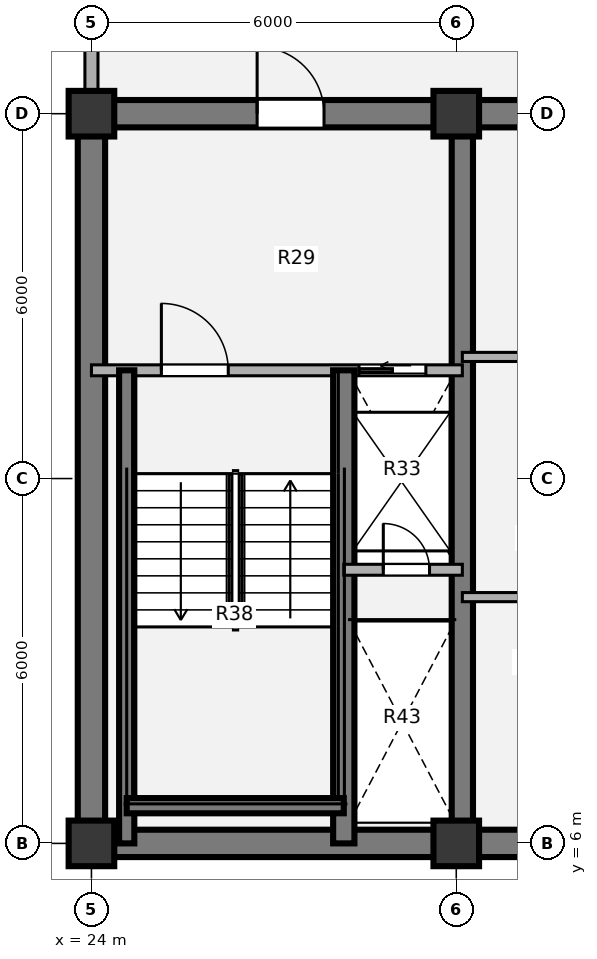
"""IFC4 building model, lengths in metres.
Left out: names, types, materials, properties, quantities, classifications, styles, units other than length and angle.
Written with IfcOpenShell. Run it as: python <this file> out.ifc"""

import sys

from ifc_helpers import new_model, si_unit, direction, frame, frame_2d, origin, origin_2d, place, context, subcontext, project, spatial, rectangle, extrude, source, transform, mapped, element, fill, save


model = new_model("IFC4")
c1 = context("Model", 3, precision=1e-05, world=origin(), true_north=direction((0.0, 1.0)))
c2 = subcontext(c1, "Body", "Model", "MODEL_VIEW")
j1 = project(units=[si_unit("LENGTHUNIT", "METRE"), si_unit("PLANEANGLEUNIT", "RADIAN")], contexts=[c1])
p1 = place(None, origin())
s1 = spatial("IfcSite", under=j1, at=p1, CompositionType="ELEMENT")
p2 = place(p1, origin())
s2 = spatial("IfcBuilding", under=s1, at=p2, CompositionType="ELEMENT")
p3 = place(p2, frame((0.0, 0.0, 205.56)))
s3 = spatial("IfcBuildingStorey", under=s2, at=p3, CompositionType="ELEMENT", Elevation=205.56)
m1 = source(origin(), c2, "Body", "SweptSolid", [
    extrude(rectangle(XDim=0.75, YDim=0.75, at=origin_2d()), origin(), (0.0, 0.0, 1.0), 3.78),
])
for number, where, z_axis, x_axis in (
    (1, (24.0, 6.0, 0.0), (0.0, 0.0, 1.0), (1.0, 0.0, 0.0)),
    (2, (30.0, 6.0, 0.0), (0.0, 0.0, 1.0), (1.0, 0.0, 0.0)),
    (3, (24.0, 18.0, 0.0), (0.0, 0.0, 1.0), (1.0, 0.0, 0.0)),
    (4, (30.0, 18.0, 0.0), (0.0, 0.0, 1.0), (1.0, 0.0, 0.0)),
):
    element("IfcColumn", number, at=place(p3, frame(where, z_axis=z_axis, x_axis=x_axis)), inside=s3, PredefinedType="COLUMN", context=c2, shape_type="MappedRepresentation", body=[
        mapped(m1, transform((0.0, 0.0, 0.0), x_axis=(1.0, 0.0, 0.0), y_axis=(0.0, 1.0, 0.0), z_axis=(0.0, 0.0, 1.0), scale=1.0)),
    ])
p4 = place(p3, frame((48.225, 6.0, 0.0), z_axis=(0.0, 0.0, 1.0), x_axis=(-1.0, 0.0, 0.0)))
e5 = element("IfcWall", 5, at=p4, inside=s3, PredefinedType="SHEAR", context=c2, shape_type="SweptSolid", body=[
    extrude(rectangle(XDim=24.45, YDim=0.45, at=frame_2d((12.225, 0.0))), origin(), (0.0, 0.0, 1.0), 3.78),
])
p5 = place(p3, frame((24.0, 6.0, 0.0), z_axis=(0.0, 0.0, 1.0), x_axis=(0.0, 1.0, 0.0)))
e6 = element("IfcWall", 6, at=p5, inside=s3, PredefinedType="SHEAR", context=c2, shape_type="SweptSolid", body=[
    extrude(rectangle(XDim=12.0, YDim=0.45, at=frame_2d((6.0, 0.0))), origin(), (0.0, 0.0, 1.0), 3.78),
])
p6 = place(p3, frame((23.775, 18.0, 0.0), z_axis=(0.0, 0.0, 1.0), x_axis=(1.0, 0.0, 0.0)))
e7 = element("IfcWall", 7, at=p6, inside=s3, PredefinedType="SHEAR", context=c2, shape_type="SweptSolid", body=[
    extrude(rectangle(XDim=9.425, YDim=0.45, at=frame_2d((4.712, 0.0))), origin(), (0.0, 0.0, 1.0), 3.78),
])
p7 = place(p6, frame((2.95, 0.0, 0.0)))
e8 = element("IfcOpeningElement", 8, at=p7, cuts=e7, PredefinedType="OPENING", context=c2, shape_type="SweptSolid", body=[
    extrude(rectangle(XDim=1.1, YDim=2.1, at=origin_2d()), frame((0.55, 0.235, 1.05), z_axis=(0.0, -1.0, 0.0), x_axis=(1.0, 0.0, 0.0)), (0.0, 0.0, 1.0), 0.47),
])
p8 = place(p3, frame((30.1, 6.0, 0.0), z_axis=(0.0, 0.0, 1.0), x_axis=(0.0, 1.0, 0.0)))
e9 = element("IfcWall", 9, at=p8, inside=s3, PredefinedType="SHEAR", context=c2, shape_type="SweptSolid", body=[
    extrude(rectangle(XDim=12.0, YDim=0.35, at=frame_2d((6.0, 0.0))), origin(), (0.0, 0.0, 1.0), 3.78),
])
p9 = place(p3, frame((24.0, 18.355, 0.0), z_axis=(0.0, 0.0, 1.0), x_axis=(0.0, 1.0, 0.0)))
e10 = element("IfcWall", 10, at=p9, inside=s3, PredefinedType="SOLIDWALL", context=c2, shape_type="SweptSolid", body=[
    extrude(rectangle(XDim=2.695, YDim=0.215, at=frame_2d((1.348, 0.0))), origin(), (0.0, 0.0, 1.0), 2.718),
])
for number, where, z_axis, x_axis in (
    (11, (30.1, 14.0, 0.0), (0.0, 0.0, 1.0), (1.0, 0.0, 0.0)),
    (12, (30.1, 10.05, 0.0), (0.0, 0.0, 1.0), (1.0, 0.0, 0.0)),
):
    element("IfcWall", number, at=place(p3, frame(where, z_axis=z_axis, x_axis=x_axis)), inside=s3, PredefinedType="PARTITIONING", context=c2, shape_type="SweptSolid", body=[
        extrude(rectangle(XDim=2.5, YDim=0.15, at=frame_2d((1.25, 0.0))), origin(), (0.0, 0.0, 1.0), 3.5),
    ])
p10 = place(p3, frame((24.0, 13.78, 0.0), z_axis=(0.0, 0.0, 1.0), x_axis=(1.0, 0.0, 0.0)))
e13 = element("IfcWall", 13, at=p10, inside=s3, PredefinedType="PARTITIONING", context=c2, shape_type="SweptSolid", body=[
    extrude(rectangle(XDim=6.1, YDim=0.18, at=frame_2d((3.05, 0.0))), origin(), (0.0, 0.0, 1.0), 3.5),
])
p11 = place(p10, frame((1.15, 0.0, 0.0)))
e14 = element("IfcOpeningElement", 14, at=p11, cuts=e13, PredefinedType="OPENING", context=c2, shape_type="SweptSolid", body=[
    extrude(rectangle(XDim=1.1, YDim=2.1, at=origin_2d()), frame((0.55, 0.1, 1.05), z_axis=(0.0, -1.0, 0.0), x_axis=(1.0, 0.0, 0.0)), (0.0, 0.0, 1.0), 0.2),
])
p12 = place(p10, frame((4.4, 0.0, 0.0)))
e15 = element("IfcOpeningElement", 15, at=p12, cuts=e13, PredefinedType="OPENING", context=c2, shape_type="SweptSolid", body=[
    extrude(rectangle(XDim=1.1, YDim=2.1, at=origin_2d()), frame((0.55, 0.1, 1.05), z_axis=(0.0, -1.0, 0.0), x_axis=(1.0, 0.0, 0.0)), (0.0, 0.0, 1.0), 0.2),
])
p13 = place(p3, frame((28.15, 6.0, 0.0), z_axis=(0.0, 0.0, 1.0), x_axis=(0.0, 1.0, 0.0)))
e16 = element("IfcWall", 16, at=p13, inside=s3, PredefinedType="SHEAR", context=c2, shape_type="SweptSolid", body=[
    extrude(rectangle(XDim=7.78, YDim=0.35, at=frame_2d((3.89, 0.0))), origin(), (0.0, 0.0, 1.0), 3.85),
])
p14 = place(p3, frame((24.58, 6.0, 0.0), z_axis=(0.0, 0.0, 1.0), x_axis=(0.0, 1.0, 0.0)))
e17 = element("IfcWall", 17, at=p14, inside=s3, PredefinedType="SHEAR", context=c2, shape_type="SweptSolid", body=[
    extrude(rectangle(XDim=7.78, YDim=0.25, at=frame_2d((3.89, 0.0))), origin(), (0.0, 0.0, 1.0), 3.85),
])
p15 = place(p3, frame((24.58, 6.62, 0.0), z_axis=(0.0, 0.0, 1.0), x_axis=(1.0, 0.0, 0.0)))
e18 = element("IfcWall", 18, at=p15, inside=s3, PredefinedType="SHEAR", context=c2, shape_type="SweptSolid", body=[
    extrude(rectangle(XDim=3.57, YDim=0.25, at=frame_2d((1.785, 0.0))), origin(), (0.0, 0.0, 1.0), 3.85),
])
p16 = place(p3, frame((28.15, 10.5, 0.0), z_axis=(0.0, 0.0, 1.0), x_axis=(1.0, 0.0, 0.0)))
e19 = element("IfcWall", 19, at=p16, inside=s3, PredefinedType="PARTITIONING", context=c2, shape_type="SweptSolid", body=[
    extrude(rectangle(XDim=1.95, YDim=0.18, at=frame_2d((0.975, 0.0))), origin(), (0.0, 0.0, 1.0), 3.5),
])
p17 = place(p16, frame((0.65, 0.0, 0.0)))
e20 = element("IfcOpeningElement", 20, at=p17, cuts=e19, PredefinedType="OPENING", context=c2, shape_type="SweptSolid", body=[
    extrude(rectangle(XDim=0.76, YDim=2.05, at=origin_2d()), frame((0.38, 0.1, 1.025), z_axis=(0.0, -1.0, 0.0), x_axis=(1.0, 0.0, 0.0)), (0.0, 0.0, 1.0), 0.2),
])
m2 = source(origin(), c2, "Body", "SweptSolid", [
    extrude(rectangle(XDim=1.1, YDim=2.1, at=origin_2d()), frame((0.55, 0.025, 1.05), z_axis=(0.0, -1.0, 0.0), x_axis=(1.0, 0.0, 0.0)), (0.0, 0.0, 1.0), 0.05),
])
p18 = place(p11, origin())
e21 = element("IfcDoor", 21, at=p18, inside=s3, OperationType="SINGLE_SWING_LEFT", PredefinedType="DOOR", context=c2, shape_type="MappedRepresentation", body=[
    mapped(m2, transform((0.0, 0.0, 0.0), x_axis=(1.0, 0.0, 0.0), y_axis=(0.0, 1.0, 0.0), z_axis=(0.0, 0.0, 1.0), scale=1.0)),
])
fill(e14, e21)
m3 = source(origin(), c2, "Body", "SweptSolid", [
    extrude(rectangle(XDim=1.1, YDim=2.1, at=origin_2d()), frame((0.55, 0.025, 1.05), z_axis=(0.0, -1.0, 0.0), x_axis=(1.0, 0.0, 0.0)), (0.0, 0.0, 1.0), 0.05),
])
p19 = place(p12, origin())
e22 = element("IfcDoor", 22, at=p19, inside=s3, OperationType="SLIDING_TO_LEFT", PredefinedType="DOOR", context=c2, shape_type="MappedRepresentation", body=[
    mapped(m3, transform((0.0, 0.0, 0.0), x_axis=(1.0, 0.0, 0.0), y_axis=(0.0, 1.0, 0.0), z_axis=(0.0, 0.0, 1.0), scale=1.0)),
])
fill(e15, e22)
m4 = source(origin(), c2, "Body", "SweptSolid", [
    extrude(rectangle(XDim=0.76, YDim=2.05, at=origin_2d()), frame((0.38, 0.025, 1.025), z_axis=(0.0, -1.0, 0.0), x_axis=(1.0, 0.0, 0.0)), (0.0, 0.0, 1.0), 0.05),
])
p20 = place(p17, origin())
e23 = element("IfcDoor", 23, at=p20, inside=s3, OperationType="SINGLE_SWING_LEFT", PredefinedType="DOOR", context=c2, shape_type="MappedRepresentation", body=[
    mapped(m4, transform((0.0, 0.0, 0.0), x_axis=(1.0, 0.0, 0.0), y_axis=(0.0, 1.0, 0.0), z_axis=(0.0, 0.0, 1.0), scale=1.0)),
])
fill(e20, e23)
m5 = source(origin(), c2, "Body", "SweptSolid", [
    extrude(rectangle(XDim=1.1, YDim=2.1, at=origin_2d()), frame((0.55, 0.025, 1.05), z_axis=(0.0, -1.0, 0.0), x_axis=(1.0, 0.0, 0.0)), (0.0, 0.0, 1.0), 0.05),
])
p21 = place(p7, origin())
e24 = element("IfcDoor", 24, at=p21, inside=s3, OperationType="SINGLE_SWING_LEFT", PredefinedType="DOOR", context=c2, shape_type="MappedRepresentation", body=[
    mapped(m5, transform((0.0, 0.0, 0.0), x_axis=(1.0, 0.0, 0.0), y_axis=(0.0, 1.0, 0.0), z_axis=(0.0, 0.0, 1.0), scale=1.0)),
])
fill(e8, e24)
save(model, sys.argv[1])
